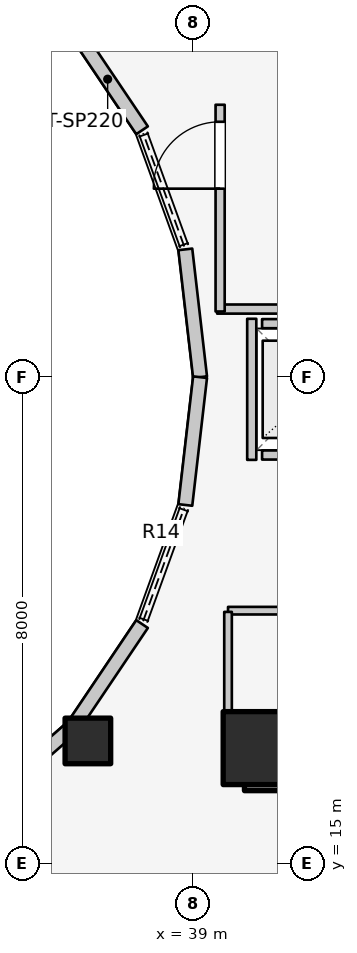
"""IFC4 building model, lengths in metres.
Left out: names, types, materials, properties, quantities, classifications, styles, units other than length and angle.
Written with IfcOpenShell. Run it as: python <this file> out.ifc"""

import sys

from ifc_helpers import new_model, si_unit, direction, frame, frame_2d, origin, origin_2d, place, context, subcontext, project, spatial, rectangle, extrude, element, fill, save


model = new_model("IFC4")
c1 = context("Model", 3, precision=1e-05, world=origin(), true_north=direction((0.0, 1.0)))
c2 = subcontext(c1, "Body", "Model", "MODEL_VIEW")
j1 = project(units=[si_unit("LENGTHUNIT", "METRE"), si_unit("PLANEANGLEUNIT", "RADIAN")], contexts=[c1])
p1 = place(None, origin())
s1 = spatial("IfcSite", under=j1, at=p1, CompositionType="ELEMENT")
p2 = place(p1, origin())
s2 = spatial("IfcBuilding", under=s1, at=p2, CompositionType="ELEMENT")
p3 = place(p2, frame((0.0, 0.0, 137.4)))
s3 = spatial("IfcBuildingStorey", under=s2, at=p3, CompositionType="ELEMENT", Elevation=137.4)
p4 = place(p3, frame((39.85, 16.55, 0.0), z_axis=(0.0, 0.0, 1.0), x_axis=(1.0, 0.0, 0.0)))
e1 = element("IfcWall", 1, at=p4, inside=s3, PredefinedType="SHEAR", context=c2, shape_type="SweptSolid", body=[
    extrude(rectangle(XDim=4.5, YDim=0.7, at=frame_2d((2.25, 0.0))), origin(), (0.0, 0.0, 1.0), 3.1),
])
p5 = place(p3, frame((40.1, 16.9, 0.0), z_axis=(0.0, 0.0, 1.0), x_axis=(1.0, 0.0, 0.0)))
e2 = element("IfcColumn", 2, at=p5, inside=s3, PredefinedType="COLUMN", context=c2, shape_type="SweptSolid", body=[
    extrude(rectangle(XDim=1.2, YDim=1.2, at=origin_2d()), origin(), (0.0, 0.0, 1.0), 3.1),
])
p6 = place(p3, frame((37.275, 17.018, 0.0), z_axis=(0.0, 0.0, 1.0), x_axis=(1.0, 0.0, 0.0)))
e3 = element("IfcColumn", 3, at=p6, inside=s3, PredefinedType="COLUMN", context=c2, shape_type="SweptSolid", body=[
    extrude(rectangle(XDim=0.75, YDim=0.75, at=origin_2d()), origin(), (0.0, 0.0, 1.0), 3.1),
])
p7 = place(p3, frame((39.12, 23.0, 0.0), z_axis=(0.0, 0.0, 1.0), x_axis=(-0.114711713601, 0.993398823617, 0.0)))
e4 = element("IfcWall", 4, at=p7, inside=s3, PredefinedType="STANDARD", context=c2, shape_type="SweptSolid", body=[
    extrude(rectangle(XDim=2.115, YDim=0.23, at=frame_2d((1.058, 0.0))), origin(), (0.0, 0.0, 1.0), 2.84),
])
p8 = place(p3, frame((38.166, 27.06, 0.0), z_axis=(0.0, 0.0, 1.0), x_axis=(-0.558197800898, 0.829707909492, 0.0)))
e5 = element("IfcWall", 5, at=p8, inside=s3, PredefinedType="STANDARD", context=c2, shape_type="SweptSolid", body=[
    extrude(rectangle(XDim=2.027, YDim=0.23, at=frame_2d((1.013, 0.0))), origin(), (0.0, 0.0, 1.0), 2.16),
])
p9 = place(p3, frame((35.56, 15.968, 0.0), z_axis=(0.0, 0.0, 1.0), x_axis=(0.752576694707, 0.658504607869, 0.0)))
e6 = element("IfcWall", 6, at=p9, inside=s3, PredefinedType="STANDARD", context=c2, shape_type="SweptSolid", body=[
    extrude(rectangle(XDim=1.959, YDim=0.23, at=frame_2d((0.98, 0.0))), origin(), (0.0, 0.0, 1.0), 2.16),
])
p10 = place(p3, frame((37.035, 17.258, 0.0), z_axis=(0.0, 0.0, 1.0), x_axis=(0.558197800898, 0.829707909492, 0.0)))
e7 = element("IfcWall", 7, at=p10, inside=s3, PredefinedType="STANDARD", context=c2, shape_type="SweptSolid", body=[
    extrude(rectangle(XDim=2.027, YDim=0.23, at=frame_2d((1.013, 0.0))), origin(), (0.0, 0.0, 1.0), 2.16),
])
p11 = place(p3, frame((38.877, 20.898, 0.0), z_axis=(0.0, 0.0, 1.0), x_axis=(0.114711713601, 0.993398823617, 0.0)))
e8 = element("IfcWall", 8, at=p11, inside=s3, PredefinedType="STANDARD", context=c2, shape_type="SweptSolid", body=[
    extrude(rectangle(XDim=2.115, YDim=0.23, at=frame_2d((1.058, 0.0))), origin(), (0.0, 0.0, 1.0), 2.84),
])
p12 = place(p3, frame((40.14, 21.72, 0.0), z_axis=(0.0, 0.0, 1.0), x_axis=(1.0, 0.0, 0.0)))
e9 = element("IfcWall", 9, at=p12, inside=s3, PredefinedType="SOLIDWALL", context=c2, shape_type="SweptSolid", body=[
    extrude(rectangle(XDim=1.82, YDim=0.15, at=frame_2d((0.91, 0.0))), origin(), (0.0, 0.0, 1.0), 2.12),
])
p13 = place(p12, frame((0.36, 0.0, 0.0)))
e10 = element("IfcOpeningElement", 10, at=p13, cuts=e9, PredefinedType="OPENING", context=c2, shape_type="SweptSolid", body=[
    extrude(rectangle(XDim=1.1, YDim=2.1, at=frame_2d((0.55, 1.05))), frame((0.0, 0.085, 0.0), z_axis=(0.0, -1.0, 0.0), x_axis=(1.0, 0.0, 0.0)), (0.0, 0.0, 1.0), 0.17),
])
p14 = place(p3, frame((40.14, 23.88, 0.0), z_axis=(0.0, 0.0, 1.0), x_axis=(1.0, 0.0, 0.0)))
e11 = element("IfcWall", 11, at=p14, inside=s3, PredefinedType="SOLIDWALL", context=c2, shape_type="SweptSolid", body=[
    extrude(rectangle(XDim=1.82, YDim=0.15, at=frame_2d((0.91, 0.0))), origin(), (0.0, 0.0, 1.0), 2.12),
])
p15 = place(p3, frame((39.97, 21.64, 0.0), z_axis=(0.0, 0.0, 1.0), x_axis=(0.0, 1.0, 0.0)))
e12 = element("IfcWall", 12, at=p15, inside=s3, PredefinedType="SOLIDWALL", context=c2, shape_type="SweptSolid", body=[
    extrude(rectangle(XDim=2.32, YDim=0.15, at=frame_2d((1.16, 0.0))), origin(), (0.0, 0.0, 1.0), 2.12),
])
p16 = place(p3, frame((39.4, 24.12, 0.0), z_axis=(0.0, 0.0, 1.0), x_axis=(1.0, 0.0, 0.0)))
e13 = element("IfcWall", 13, at=p16, inside=s3, PredefinedType="PARTITIONING", context=c2, shape_type="SweptSolid", body=[
    extrude(rectangle(XDim=5.08, YDim=0.15, at=frame_2d((2.54, 0.0))), origin(), (0.0, 0.0, 1.0), 2.12),
])
p17 = place(p3, frame((39.45, 24.08, 0.0), z_axis=(0.0, 0.0, 1.0), x_axis=(0.0, 1.0, 0.0)))
e14 = element("IfcWall", 14, at=p17, inside=s3, PredefinedType="PARTITIONING", context=c2, shape_type="SweptSolid", body=[
    extrude(rectangle(XDim=3.4, YDim=0.15, at=frame_2d((1.7, 0.0))), origin(), (0.0, 0.0, 1.0), 2.855),
])
p18 = place(p17, frame((2.02, 0.0, 0.0)))
e15 = element("IfcOpeningElement", 15, at=p18, cuts=e14, PredefinedType="OPENING", context=c2, shape_type="SweptSolid", body=[
    extrude(rectangle(XDim=1.1, YDim=2.1, at=frame_2d((0.55, 1.05))), frame((0.0, 0.085, 0.0), z_axis=(0.0, -1.0, 0.0), x_axis=(1.0, 0.0, 0.0)), (0.0, 0.0, 1.0), 0.17),
])
p19 = place(p3, frame((39.58, 19.16, 0.0), z_axis=(0.0, 0.0, 1.0), x_axis=(1.0, 0.0, 0.0)))
e16 = element("IfcWall", 16, at=p19, inside=s3, PredefinedType="PARTITIONING", context=c2, shape_type="SweptSolid", body=[
    extrude(rectangle(XDim=4.87, YDim=0.125, at=frame_2d((2.435, 0.0))), origin(), (0.0, 0.0, 1.0), 2.12),
])
p20 = place(p19, frame((3.45, 0.0, 0.0)))
e17 = element("IfcOpeningElement", 17, at=p20, cuts=e16, PredefinedType="OPENING", context=c2, shape_type="SweptSolid", body=[
    extrude(rectangle(XDim=0.85, YDim=2.05, at=frame_2d((0.425, 1.025))), frame((0.0, 0.073, 0.0), z_axis=(0.0, -1.0, 0.0), x_axis=(1.0, 0.0, 0.0)), (0.0, 0.0, 1.0), 0.145),
])
p21 = place(p3, frame((39.58, 17.1, 0.0), z_axis=(0.0, 0.0, 1.0), x_axis=(0.0, 1.0, 0.0)))
e18 = element("IfcWall", 18, at=p21, inside=s3, PredefinedType="PARTITIONING", context=c2, shape_type="SweptSolid", body=[
    extrude(rectangle(XDim=2.04, YDim=0.125, at=frame_2d((1.02, 0.0))), origin(), (0.0, 0.0, 1.0), 2.232),
])
p22 = place(p3, frame((35.55, 15.985, 0.0), z_axis=(0.0, 0.0, 1.0), x_axis=(0.525627246902, -0.850714991824, 0.0)))
e19 = element("IfcWall", 19, at=p22, inside=s3, PredefinedType="PARTITIONING", context=c2, shape_type="SweptSolid", body=[
    extrude(rectangle(XDim=2.901, YDim=0.125, at=frame_2d((1.451, 0.0))), origin(), (0.0, 0.0, 1.0), 2.299),
])
p23 = place(p18, origin())
e20 = element("IfcDoor", 20, at=p23, inside=s3, OperationType="SINGLE_SWING_LEFT", PredefinedType="DOOR", context=c2, shape_type="SweptSolid", body=[
    extrude(rectangle(XDim=1.1, YDim=2.1, at=frame_2d((0.55, 1.05))), frame((0.0, 0.025, 0.0), z_axis=(0.0, -1.0, 0.0), x_axis=(1.0, 0.0, 0.0)), (0.0, 0.0, 1.0), 0.05),
])
fill(e15, e20)
save(model, sys.argv[1])
